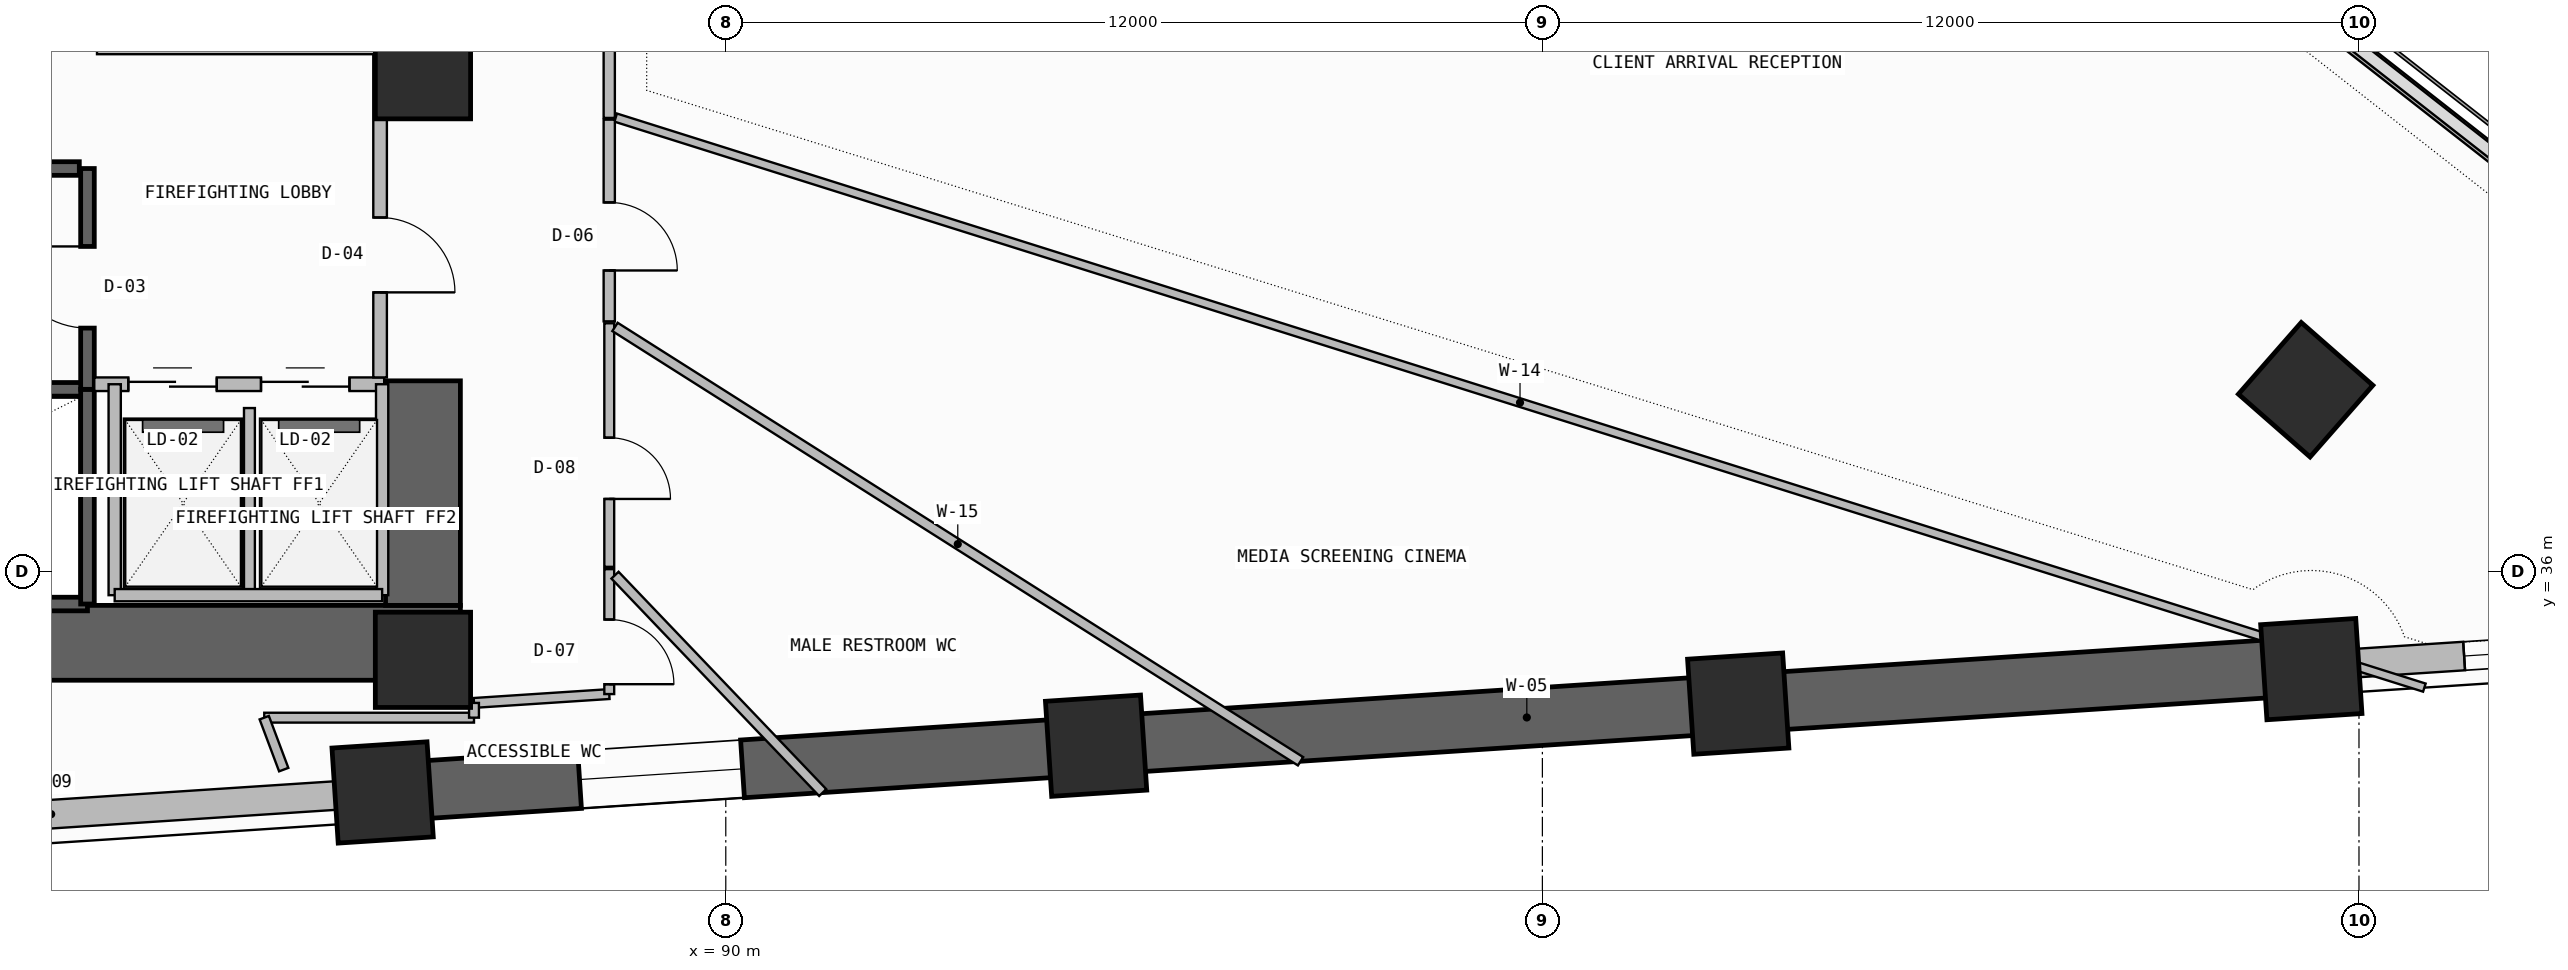
"""IFC4 building model, lengths in metres.
Left out: names, types, materials, properties, quantities, classifications, styles, units other than length and angle.
Written with IfcOpenShell. Run it as: python <this file> out.ifc"""

import sys

from ifc_helpers import new_model, si_unit, direction, frame, frame_2d, origin, origin_2d, place, context, subcontext, project, spatial, rectangle, extrude, element, fill, save


model = new_model("IFC4")
c1 = context("Model", 3, precision=1e-05, world=origin(), true_north=direction((0.0, 1.0)))
c2 = subcontext(c1, "Body", "Model", "MODEL_VIEW")
j1 = project(units=[si_unit("LENGTHUNIT", "METRE"), si_unit("PLANEANGLEUNIT", "RADIAN")], contexts=[c1])
p1 = place(None, origin())
s1 = spatial("IfcSite", under=j1, at=p1, CompositionType="ELEMENT")
p2 = place(p1, origin())
s2 = spatial("IfcBuilding", under=s1, at=p2, CompositionType="ELEMENT")
p3 = place(p2, frame((0.0, 0.0, 70.5)))
s3 = spatial("IfcBuildingStorey", under=s2, at=p3, CompositionType="ELEMENT", Elevation=70.5)
p4 = place(p3, frame((71.8, 34.95, -0.26), z_axis=(0.0, 0.0, 1.0), x_axis=(1.0, 0.0, 0.0)))
e1 = element("IfcWall", 1, at=p4, inside=s3, PredefinedType="SHEAR", context=c2, shape_type="SweptSolid", body=[
    extrude(rectangle(XDim=14.3, YDim=1.1, at=frame_2d((7.15, 0.0))), origin(), (0.0, 0.0, 1.0), 3.6),
])
p5 = place(p3, frame((85.55, 35.5, -0.26), z_axis=(0.0, 0.0, 1.0), x_axis=(0.0, 1.0, 0.0)))
e2 = element("IfcWall", 2, at=p5, inside=s3, PredefinedType="SHEAR", context=c2, shape_type="SweptSolid", body=[
    extrude(rectangle(XDim=3.3, YDim=1.1, at=frame_2d((1.65, 0.0))), origin(), (0.0, 0.0, 1.0), 3.6),
])
for number, where, z_axis, x_axis in (
    (3, (85.55, 34.7, 0.0), (0.0, 0.0, 1.0), (1.0, 0.0, 0.0)),
    (4, (85.55, 43.35, 0.0), (0.0, 0.0, 1.0), (1.0, 0.0, 0.0)),
    (5, (84.957, 32.751, 0.0), (0.0, 0.0, 1.0), (0.998, 0.065, 0.0)),
    (6, (95.442, 33.438, 0.0), (0.0, 0.0, 1.0), (0.998, 0.065, 0.0)),
    (7, (104.878, 34.057, 0.0), (0.0, 0.0, 1.0), (0.998, 0.065, 0.0)),
    (8, (113.3, 34.563, 0.0), (0.0, 0.0, 1.0), (0.998, 0.065, 0.0)),
    (9, (113.216, 38.669, 0.0), (0.0, 0.0, 1.0), (0.659, 0.752, 0.0)),
):
    element("IfcColumn", number, at=place(p3, frame(where, z_axis=z_axis, x_axis=x_axis)), inside=s3, PredefinedType="COLUMN", context=c2, shape_type="SweptSolid", body=[
        extrude(rectangle(XDim=1.4, YDim=1.4, at=origin_2d()), origin(), (0.0, 0.0, 1.0), 3.6),
    ])
p6 = place(p3, frame((67.133, 31.583, 0.0), z_axis=(0.0, 0.0, 1.0), x_axis=(0.997859040617, 0.065401338356, 0.0)))
e10 = element("IfcWall", 10, at=p6, inside=s3, PredefinedType="SOLIDWALL", context=c2, shape_type="SweptSolid", body=[
    extrude(rectangle(XDim=17.862, YDim=0.42, at=frame_2d((8.931, 0.0))), origin(), (0.0, 0.0, 1.0), 2.325),
])
p7 = place(p6, frame((5.7, 0.0, 1.2)))
e11 = element("IfcOpeningElement", 11, at=p7, cuts=e10, PredefinedType="OPENING", context=c2, shape_type="SweptSolid", body=[
    extrude(rectangle(XDim=2.4, YDim=0.9, at=frame_2d((1.2, 0.45))), frame((0.0, 0.22, 0.0), z_axis=(0.0, -1.0, 0.0), x_axis=(1.0, 0.0, 0.0)), (0.0, 0.0, 1.0), 0.44),
])
p8 = place(p3, frame((84.957, 32.751, -0.26), z_axis=(0.0, 0.0, 1.0), x_axis=(0.997859046449, 0.065401249368, 0.0)))
e12 = element("IfcWall", 12, at=p8, inside=s3, PredefinedType="SHEAR", context=c2, shape_type="SweptSolid", body=[
    extrude(rectangle(XDim=28.4, YDim=0.85, at=frame_2d((14.2, 0.0))), origin(), (0.0, 0.0, 1.0), 3.6),
])
p9 = place(p8, frame((2.9, 0.0, 1.2)))
e13 = element("IfcOpeningElement", 13, at=p9, cuts=e12, PredefinedType="OPENING", context=c2, shape_type="SweptSolid", body=[
    extrude(rectangle(XDim=2.4, YDim=0.9, at=frame_2d((1.2, 0.45))), frame((0.0, 0.435, 0.0), z_axis=(0.0, -1.0, 0.0), x_axis=(1.0, 0.0, 0.0)), (0.0, 0.0, 1.0), 0.87),
])
p10 = place(p3, frame((113.297, 34.608, 0.0), z_axis=(0.0, 0.0, 1.0), x_axis=(0.997857907016, 0.065418631945, 0.0)))
e14 = element("IfcWall", 14, at=p10, inside=s3, PredefinedType="SOLIDWALL", context=c2, shape_type="SweptSolid", body=[
    extrude(rectangle(XDim=6.273, YDim=0.42, at=frame_2d((3.137, 0.0))), origin(), (0.0, 0.0, 1.0), 2.325),
])
p11 = place(p10, frame((2.253, 0.0, 1.2)))
e15 = element("IfcOpeningElement", 15, at=p11, cuts=e14, PredefinedType="OPENING", context=c2, shape_type="SweptSolid", body=[
    extrude(rectangle(XDim=2.4, YDim=0.9, at=frame_2d((1.2, 0.45))), frame((0.0, 0.22, 0.0), z_axis=(0.0, -1.0, 0.0), x_axis=(1.0, 0.0, 0.0)), (0.0, 0.0, 1.0), 0.44),
])
p12 = place(p3, frame((121.476, 37.781, 0.0), z_axis=(0.0, 0.0, 1.0), x_axis=(-0.787385636484, 0.61646075257, 0.0)))
e16 = element("IfcWall", 16, at=p12, inside=s3, PredefinedType="PARAPET", context=c2, shape_type="SweptSolid", body=[
    extrude(rectangle(XDim=35.957, YDim=0.2, at=frame_2d((17.979, 0.0))), origin(), (0.0, 0.0, 1.0), 1.15),
])
for number, where, z_axis, x_axis in (
    (17, (72.92, 35.52, -0.26), (0.0, 0.0, 1.0), (1.0, 0.0, 0.0)),
    (18, (72.92, 38.675, -0.26), (0.0, 0.0, 1.0), (1.0, 0.0, 0.0)),
):
    element("IfcWall", number, at=place(p3, frame(where, z_axis=z_axis, x_axis=x_axis)), inside=s3, PredefinedType="SOLIDWALL", context=c2, shape_type="SweptSolid", body=[
        extrude(rectangle(XDim=7.7, YDim=0.2, at=frame_2d((3.85, 0.0))), origin(), (0.0, 0.0, 1.0), 3.6),
    ])
p13 = place(p3, frame((80.62, 35.52, -0.26), z_axis=(0.0, 0.0, 1.0), x_axis=(0.0, 1.0, 0.0)))
e19 = element("IfcWall", 19, at=p13, inside=s3, PredefinedType="SOLIDWALL", context=c2, shape_type="SweptSolid", body=[
    extrude(rectangle(XDim=3.155, YDim=0.2, at=frame_2d((1.578, 0.0))), origin(), (0.0, 0.0, 1.0), 3.6),
])
p14 = place(p3, frame((80.62, 38.675, -0.26), z_axis=(0.0, 0.0, 1.0), x_axis=(0.0, 1.0, 0.0)))
e20 = element("IfcWall", 20, at=p14, inside=s3, PredefinedType="SOLIDWALL", context=c2, shape_type="SweptSolid", body=[
    extrude(rectangle(XDim=3.245, YDim=0.2, at=frame_2d((1.623, 0.0))), origin(), (0.0, 0.0, 1.0), 3.6),
])
p15 = place(p14, frame((0.9, 0.0, 0.26)))
e21 = element("IfcOpeningElement", 21, at=p15, cuts=e20, PredefinedType="OPENING", context=c2, shape_type="SweptSolid", body=[
    extrude(rectangle(XDim=1.2, YDim=2.2, at=frame_2d((0.6, 1.1))), frame((0.0, 0.11, 0.0), z_axis=(0.0, -1.0, 0.0), x_axis=(1.0, 0.0, 0.0)), (0.0, 0.0, 1.0), 0.22),
])
p16 = place(p3, frame((80.72, 38.75, 0.0), z_axis=(0.0, 0.0, 1.0), x_axis=(1.0, 0.0, 0.0)))
e22 = element("IfcWall", 22, at=p16, inside=s3, PredefinedType="SOLIDWALL", context=c2, shape_type="SweptSolid", body=[
    extrude(rectangle(XDim=4.26, YDim=0.2, at=frame_2d((2.13, 0.0))), origin(), (0.0, 0.0, 1.0), 3.34),
])
p17 = place(p16, frame((0.5, 0.0, 0.0)))
e23 = element("IfcOpeningElement", 23, at=p17, cuts=e22, PredefinedType="OPENING", context=c2, shape_type="SweptSolid", body=[
    extrude(rectangle(XDim=1.3, YDim=2.3, at=frame_2d((0.65, 1.15))), frame((0.0, 0.11, 0.0), z_axis=(0.0, -1.0, 0.0), x_axis=(1.0, 0.0, 0.0)), (0.0, 0.0, 1.0), 0.22),
])
p18 = place(p16, frame((2.45, 0.0, 0.0)))
e24 = element("IfcOpeningElement", 24, at=p18, cuts=e22, PredefinedType="OPENING", context=c2, shape_type="SweptSolid", body=[
    extrude(rectangle(XDim=1.3, YDim=2.3, at=frame_2d((0.65, 1.15))), frame((0.0, 0.11, 0.0), z_axis=(0.0, -1.0, 0.0), x_axis=(1.0, 0.0, 0.0)), (0.0, 0.0, 1.0), 0.22),
])
p19 = place(p3, frame((83.0, 35.65, 0.0), z_axis=(0.0, 0.0, 1.0), x_axis=(0.0, 1.0, 0.0)))
e25 = element("IfcWall", 25, at=p19, inside=s3, PredefinedType="PLUMBINGWALL", context=c2, shape_type="SweptSolid", body=[
    extrude(rectangle(XDim=2.75, YDim=0.16, at=frame_2d((1.375, 0.0))), origin(), (0.0, 0.0, 1.0), 3.34),
])
for number, where, z_axis, x_axis in (
    (26, (84.95, 35.65, 0.0), (0.0, 0.0, 1.0), (0.0, 1.0, 0.0)),
    (27, (81.02, 35.65, 0.0), (0.0, 0.0, 1.0), (0.0, 1.0, 0.0)),
):
    element("IfcWall", number, at=place(p3, frame(where, z_axis=z_axis, x_axis=x_axis)), inside=s3, PredefinedType="SOLIDWALL", context=c2, shape_type="SweptSolid", body=[
        extrude(rectangle(XDim=3.1, YDim=0.18, at=frame_2d((1.55, 0.0))), origin(), (0.0, 0.0, 1.0), 3.34),
    ])
p20 = place(p3, frame((81.02, 35.65, 0.0), z_axis=(0.0, 0.0, 1.0), x_axis=(1.0, 0.0, 0.0)))
e28 = element("IfcWall", 28, at=p20, inside=s3, PredefinedType="SOLIDWALL", context=c2, shape_type="SweptSolid", body=[
    extrude(rectangle(XDim=3.93, YDim=0.18, at=frame_2d((1.965, 0.0))), origin(), (0.0, 0.0, 1.0), 3.34),
])
p21 = place(p3, frame((84.92, 38.85, 0.0), z_axis=(0.0, 0.0, 1.0), x_axis=(0.0, 1.0, 0.0)))
e29 = element("IfcWall", 29, at=p21, inside=s3, PredefinedType="SOLIDWALL", context=c2, shape_type="SweptSolid", body=[
    extrude(rectangle(XDim=4.83, YDim=0.2, at=frame_2d((2.415, 0.0))), origin(), (0.0, 0.0, 1.0), 3.34),
])
p22 = place(p21, frame((1.25, 0.0, 0.0)))
e30 = element("IfcOpeningElement", 30, at=p22, cuts=e29, PredefinedType="OPENING", context=c2, shape_type="SweptSolid", body=[
    extrude(rectangle(XDim=1.1, YDim=2.2, at=frame_2d((0.55, 1.1))), frame((0.0, 0.11, 0.0), z_axis=(0.0, -1.0, 0.0), x_axis=(1.0, 0.0, 0.0)), (0.0, 0.0, 1.0), 0.22),
])
p23 = place(p3, frame((72.92, 41.92, -0.26), z_axis=(0.0, 0.0, 1.0), x_axis=(1.0, 0.0, 0.0)))
e31 = element("IfcWall", 31, at=p23, inside=s3, PredefinedType="SOLIDWALL", context=c2, shape_type="SweptSolid", body=[
    extrude(rectangle(XDim=7.58, YDim=0.2, at=frame_2d((3.79, 0.0))), origin(), (0.0, 0.0, 1.0), 3.6),
])
p24 = place(p3, frame((80.76, 43.68, 0.0), z_axis=(0.0, 0.0, 1.0), x_axis=(1.0, 0.0, 0.0)))
e32 = element("IfcWall", 32, at=p24, inside=s3, PredefinedType="PLUMBINGWALL", context=c2, shape_type="SweptSolid", body=[
    extrude(rectangle(XDim=4.19, YDim=0.16, at=frame_2d((2.095, 0.0))), origin(), (0.0, 0.0, 1.0), 3.34),
])
p25 = place(p3, frame((86.3, 34.067, 0.0), z_axis=(0.0, 0.0, 1.0), x_axis=(0.997863634979, 0.065331202241, 0.0)))
e33 = element("IfcWall", 33, at=p25, inside=s3, PredefinedType="PARTITIONING", context=c2, shape_type="SweptSolid", body=[
    extrude(rectangle(XDim=1.992, YDim=0.145, at=frame_2d((0.996, 0.0))), origin(), (0.0, 0.0, 1.0), 3.34),
])
p26 = place(p3, frame((88.288, 34.197, 0.0), z_axis=(0.0, 0.0, 1.0), x_axis=(0.0, 1.0, 0.0)))
e34 = element("IfcWall", 34, at=p26, inside=s3, PredefinedType="PARTITIONING", context=c2, shape_type="SweptSolid", body=[
    extrude(rectangle(XDim=1.836, YDim=0.145, at=frame_2d((0.918, 0.0))), origin(), (0.0, 0.0, 1.0), 2.725),
])
p27 = place(p26, frame((0.145, 0.0, 0.0)))
e35 = element("IfcOpeningElement", 35, at=p27, cuts=e34, PredefinedType="OPENING", context=c2, shape_type="SweptSolid", body=[
    extrude(rectangle(XDim=0.95, YDim=2.15, at=frame_2d((0.475, 1.075))), frame((0.0, 0.083, 0.0), z_axis=(0.0, -1.0, 0.0), x_axis=(1.0, 0.0, 0.0)), (0.0, 0.0, 1.0), 0.165),
])
p28 = place(p3, frame((88.372, 35.944, 0.0), z_axis=(0.0, 0.0, 1.0), x_axis=(0.690762144464, -0.723082056046, 0.0)))
e36 = element("IfcWall", 36, at=p28, inside=s3, PredefinedType="PARTITIONING", context=c2, shape_type="SweptSolid", body=[
    extrude(rectangle(XDim=4.419, YDim=0.145, at=frame_2d((2.209, 0.0))), origin(), (0.0, 0.0, 1.0), 2.325),
])
p29 = place(p3, frame((88.288, 36.066, 0.0), z_axis=(0.0, 0.0, 1.0), x_axis=(0.0, 1.0, 0.0)))
e37 = element("IfcWall", 37, at=p29, inside=s3, PredefinedType="PARTITIONING", context=c2, shape_type="SweptSolid", body=[
    extrude(rectangle(XDim=3.58, YDim=0.145, at=frame_2d((1.79, 0.0))), origin(), (0.0, 0.0, 1.0), 3.34),
])
p30 = place(p29, frame((0.998, 0.0, 0.0)))
e38 = element("IfcOpeningElement", 38, at=p30, cuts=e37, PredefinedType="OPENING", context=c2, shape_type="SweptSolid", body=[
    extrude(rectangle(XDim=0.9, YDim=2.1, at=frame_2d((0.45, 1.05))), frame((0.0, 0.083, 0.0), z_axis=(0.0, -1.0, 0.0), x_axis=(1.0, 0.0, 0.0)), (0.0, 0.0, 1.0), 0.165),
])
p31 = place(p3, frame((88.372, 39.592, 0.0), z_axis=(0.0, 0.0, 1.0), x_axis=(0.844706784155, -0.535229342248, 0.0)))
e39 = element("IfcWall", 39, at=p31, inside=s3, PredefinedType="PARTITIONING", context=c2, shape_type="SweptSolid", body=[
    extrude(rectangle(XDim=11.926, YDim=0.145, at=frame_2d((5.963, 0.0))), origin(), (0.0, 0.0, 1.0), 2.325),
])
p32 = place(p3, frame((88.288, 42.664, 0.0), z_axis=(0.0, 0.0, 1.0), x_axis=(0.0, 1.0, 0.0)))
e40 = element("IfcWall", 40, at=p32, inside=s3, PredefinedType="PARTITIONING", context=c2, shape_type="SweptSolid", body=[
    extrude(rectangle(XDim=4.452, YDim=0.165, at=frame_2d((2.226, 0.0))), origin(), (0.0, 0.0, 1.0), 2.725),
])
p33 = place(p32, frame((1.726, 0.0, 0.0)))
e41 = element("IfcOpeningElement", 41, at=p33, cuts=e40, PredefinedType="OPENING", context=c2, shape_type="SweptSolid", body=[
    extrude(rectangle(XDim=1.0, YDim=2.2, at=frame_2d((0.5, 1.1))), frame((0.0, 0.093, 0.0), z_axis=(0.0, -1.0, 0.0), x_axis=(1.0, 0.0, 0.0)), (0.0, 0.0, 1.0), 0.185),
])
p34 = place(p3, frame((114.961, 34.292, 0.0), z_axis=(0.0, 0.0, 1.0), x_axis=(-0.953750406016, 0.300599672361, 0.0)))
e42 = element("IfcWall", 42, at=p34, inside=s3, PredefinedType="PARTITIONING", context=c2, shape_type="SweptSolid", body=[
    extrude(rectangle(XDim=27.867, YDim=0.125, at=frame_2d((13.934, 0.0))), origin(), (0.0, 0.0, 1.0), 2.325),
])
p35 = place(p3, frame((88.288, 39.674, 0.0), z_axis=(0.0, 0.0, 1.0), x_axis=(0.0, 1.0, 0.0)))
e43 = element("IfcWall", 43, at=p35, inside=s3, PredefinedType="PARTITIONING", context=c2, shape_type="SweptSolid", body=[
    extrude(rectangle(XDim=2.964, YDim=0.165, at=frame_2d((1.482, 0.0))), origin(), (0.0, 0.0, 1.0), 3.34),
])
p36 = place(p35, frame((0.748, 0.0, 0.0)))
e44 = element("IfcOpeningElement", 44, at=p36, cuts=e43, PredefinedType="OPENING", context=c2, shape_type="SweptSolid", body=[
    extrude(rectangle(XDim=1.0, YDim=2.2, at=frame_2d((0.5, 1.1))), frame((0.0, 0.093, 0.0), z_axis=(0.0, -1.0, 0.0), x_axis=(1.0, 0.0, 0.0)), (0.0, 0.0, 1.0), 0.185),
])
p37 = place(p3, frame((83.218, 33.85, 0.0), z_axis=(0.0, 0.0, 1.0), x_axis=(1.0, 0.0, 0.0)))
e45 = element("IfcWall", 45, at=p37, inside=s3, PredefinedType="PARTITIONING", context=c2, shape_type="SweptSolid", body=[
    extrude(rectangle(XDim=3.082, YDim=0.145, at=frame_2d((1.541, 0.0))), origin(), (0.0, 0.0, 1.0), 2.725),
])
p38 = place(p3, frame((86.3, 33.85, 0.0), z_axis=(0.0, 0.0, 1.0), x_axis=(0.0, 1.0, 0.0)))
e46 = element("IfcWall", 46, at=p38, inside=s3, PredefinedType="PARTITIONING", context=c2, shape_type="SweptSolid", body=[
    extrude(rectangle(XDim=0.217, YDim=0.145, at=frame_2d((0.108, 0.0))), origin(), (0.0, 0.0, 1.0), 3.34),
])
p39 = place(p3, frame((83.504, 33.087, 0.0), z_axis=(0.0, 0.0, 1.0), x_axis=(-0.350959352157, 0.936390694707, 0.0)))
e47 = element("IfcWall", 47, at=p39, inside=s3, PredefinedType="PARTITIONING", context=c2, shape_type="SweptSolid", body=[
    extrude(rectangle(XDim=0.815, YDim=0.145, at=frame_2d((0.408, 0.0))), origin(), (0.0, 0.0, 1.0), 3.34),
])
p40 = place(p9, origin())
e48 = element("IfcWindow", 48, at=p40, inside=s3, PartitioningType="SINGLE_PANEL", PredefinedType="WINDOW", context=c2, shape_type="SweptSolid", body=[
    extrude(rectangle(XDim=2.4, YDim=0.9, at=frame_2d((1.2, 0.45))), frame((0.0, 0.03, 0.0), z_axis=(0.0, -1.0, 0.0), x_axis=(1.0, 0.0, 0.0)), (0.0, 0.0, 1.0), 0.06),
])
fill(e13, e48)
p41 = place(p11, origin())
e49 = element("IfcWindow", 49, at=p41, inside=s3, PartitioningType="SINGLE_PANEL", PredefinedType="WINDOW", context=c2, shape_type="SweptSolid", body=[
    extrude(rectangle(XDim=2.4, YDim=0.9, at=frame_2d((1.2, 0.45))), frame((0.0, 0.03, 0.0), z_axis=(0.0, -1.0, 0.0), x_axis=(1.0, 0.0, 0.0)), (0.0, 0.0, 1.0), 0.06),
])
fill(e15, e49)
p42 = place(p15, origin())
e50 = element("IfcDoor", 50, at=p42, inside=s3, OperationType="SINGLE_SWING_RIGHT", PredefinedType="USERDEFINED", context=c2, shape_type="SweptSolid", body=[
    extrude(rectangle(XDim=1.2, YDim=2.2, at=frame_2d((0.6, 1.1))), frame((0.0, 0.025, 0.0), z_axis=(0.0, -1.0, 0.0), x_axis=(1.0, 0.0, 0.0)), (0.0, 0.0, 1.0), 0.05),
])
fill(e21, e50)
p43 = place(p17, origin())
e51 = element("IfcDoor", 51, at=p43, inside=s3, OperationType="DOUBLE_DOOR_SLIDING", PredefinedType="DOOR", context=c2, shape_type="SweptSolid", body=[
    extrude(rectangle(XDim=1.3, YDim=2.3, at=frame_2d((0.65, 1.15))), frame((0.0, 0.025, 0.0), z_axis=(0.0, -1.0, 0.0), x_axis=(1.0, 0.0, 0.0)), (0.0, 0.0, 1.0), 0.05),
])
fill(e23, e51)
p44 = place(p18, origin())
e52 = element("IfcDoor", 52, at=p44, inside=s3, OperationType="DOUBLE_DOOR_SLIDING", PredefinedType="DOOR", context=c2, shape_type="SweptSolid", body=[
    extrude(rectangle(XDim=1.3, YDim=2.3, at=frame_2d((0.65, 1.15))), frame((0.0, 0.025, 0.0), z_axis=(0.0, -1.0, 0.0), x_axis=(1.0, 0.0, 0.0)), (0.0, 0.0, 1.0), 0.05),
])
fill(e24, e52)
p45 = place(p22, frame((1.1, 0.0, 0.0), z_axis=(0.0, 0.0, 1.0), x_axis=(-1.0, 0.0, 0.0)))
e53 = element("IfcDoor", 53, at=p45, inside=s3, OperationType="SINGLE_SWING_RIGHT", PredefinedType="DOOR", context=c2, shape_type="SweptSolid", body=[
    extrude(rectangle(XDim=1.1, YDim=2.2, at=frame_2d((0.55, 1.1))), frame((0.0, 0.025, 0.0), z_axis=(0.0, -1.0, 0.0), x_axis=(1.0, 0.0, 0.0)), (0.0, 0.0, 1.0), 0.05),
])
fill(e30, e53)
p46 = place(p27, frame((0.95, 0.0, 0.0), z_axis=(0.0, 0.0, 1.0), x_axis=(-1.0, 0.0, 0.0)))
e54 = element("IfcDoor", 54, at=p46, inside=s3, OperationType="SINGLE_SWING_RIGHT", PredefinedType="DOOR", context=c2, shape_type="SweptSolid", body=[
    extrude(rectangle(XDim=0.95, YDim=2.15, at=frame_2d((0.475, 1.075))), frame((0.0, 0.025, 0.0), z_axis=(0.0, -1.0, 0.0), x_axis=(1.0, 0.0, 0.0)), (0.0, 0.0, 1.0), 0.05),
])
fill(e35, e54)
p47 = place(p30, frame((0.9, 0.0, 0.0), z_axis=(0.0, 0.0, 1.0), x_axis=(-1.0, 0.0, 0.0)))
e55 = element("IfcDoor", 55, at=p47, inside=s3, OperationType="SINGLE_SWING_RIGHT", PredefinedType="DOOR", context=c2, shape_type="SweptSolid", body=[
    extrude(rectangle(XDim=0.9, YDim=2.1, at=frame_2d((0.45, 1.05))), frame((0.0, 0.025, 0.0), z_axis=(0.0, -1.0, 0.0), x_axis=(1.0, 0.0, 0.0)), (0.0, 0.0, 1.0), 0.05),
])
fill(e38, e55)
p48 = place(p36, frame((1.0, 0.0, 0.0), z_axis=(0.0, 0.0, 1.0), x_axis=(-1.0, 0.0, 0.0)))
e56 = element("IfcDoor", 56, at=p48, inside=s3, OperationType="SINGLE_SWING_RIGHT", PredefinedType="DOOR", context=c2, shape_type="SweptSolid", body=[
    extrude(rectangle(XDim=1.0, YDim=2.2, at=frame_2d((0.5, 1.1))), frame((0.0, 0.025, 0.0), z_axis=(0.0, -1.0, 0.0), x_axis=(1.0, 0.0, 0.0)), (0.0, 0.0, 1.0), 0.05),
])
fill(e44, e56)
save(model, sys.argv[1])
